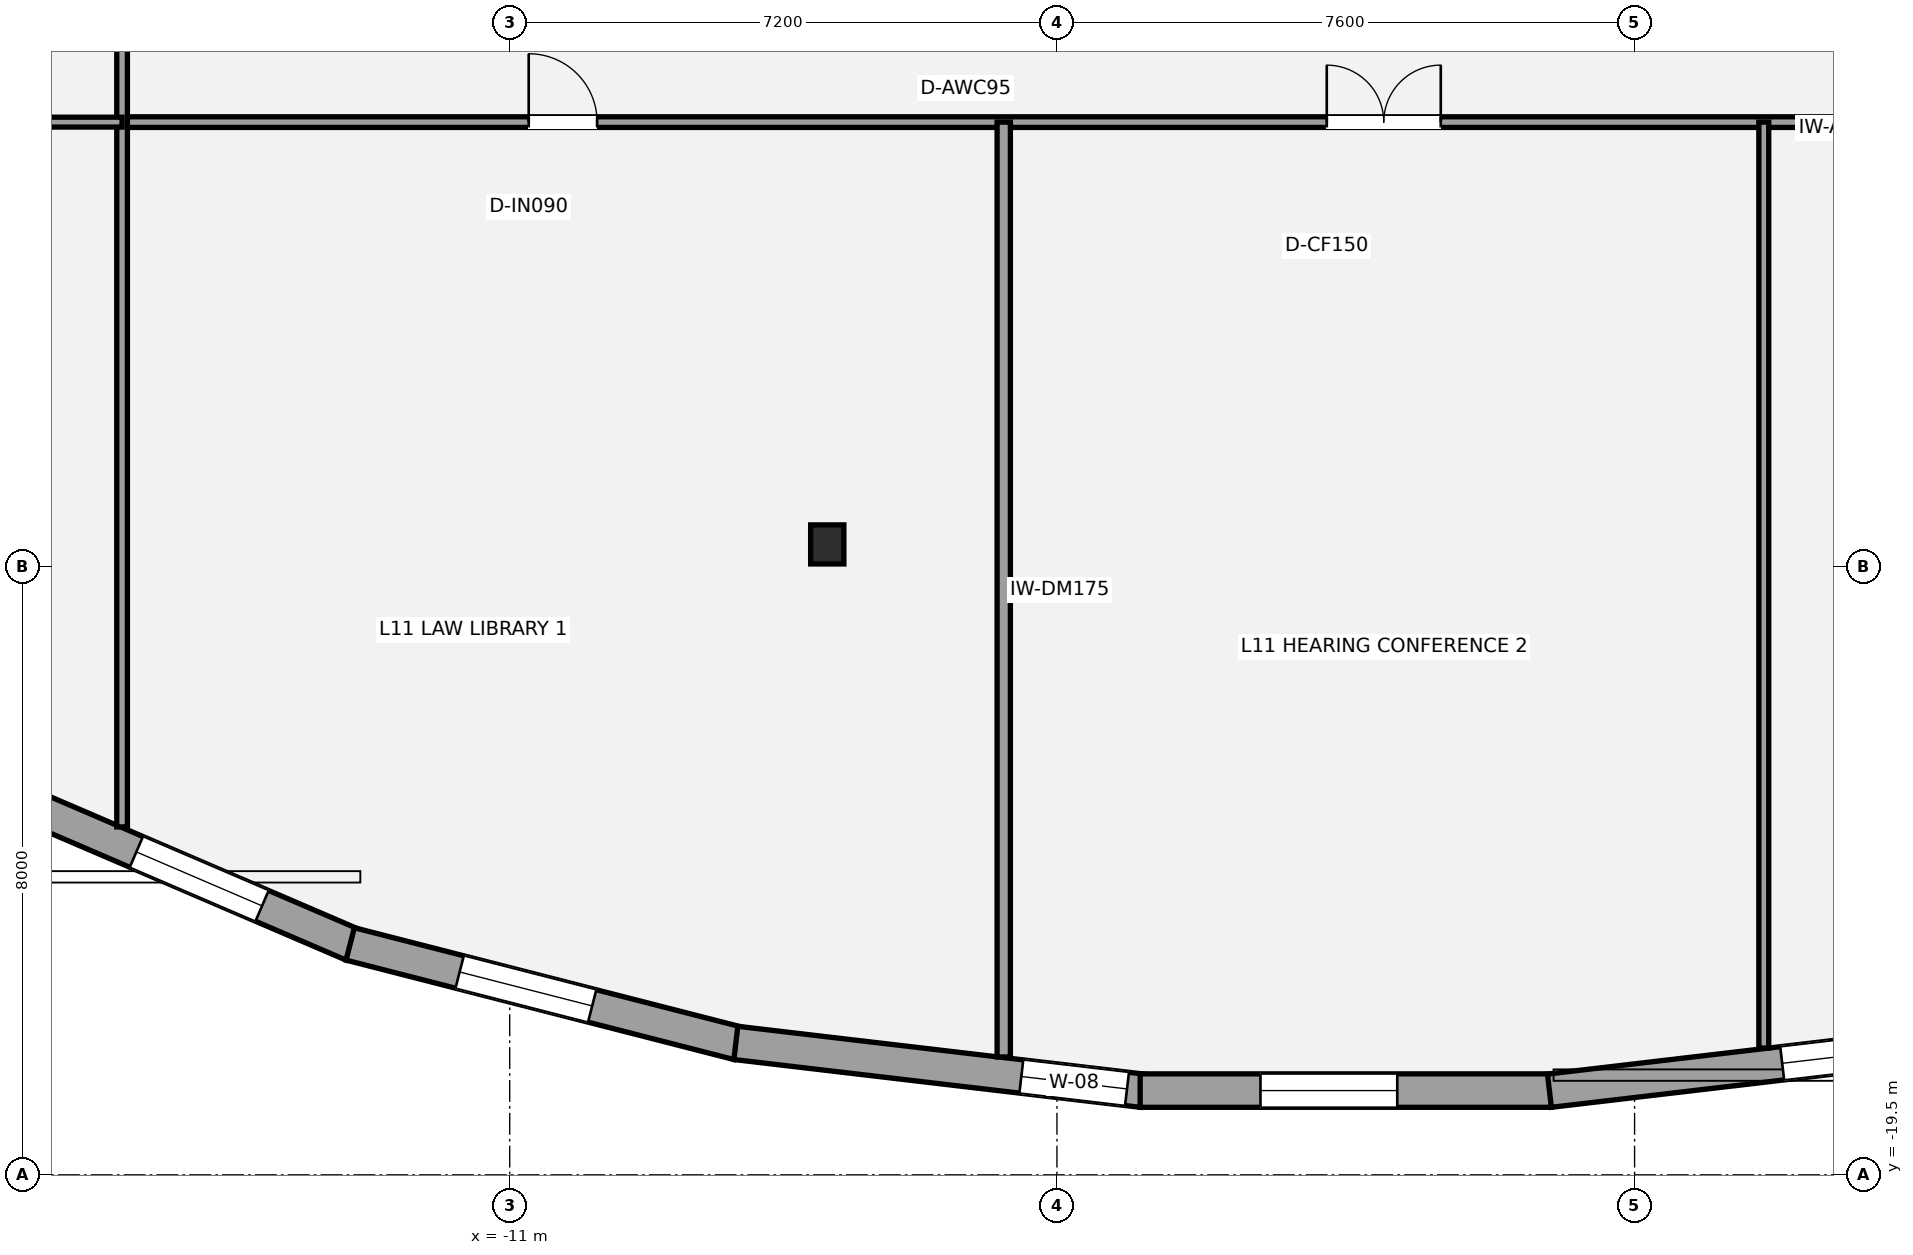
"""IFC4 building model, lengths in metres.
Left out: names, types, materials, properties, quantities, classifications, styles, units other than length and angle.
Written with IfcOpenShell. Run it as: python <this file> out.ifc"""

import sys

from ifc_helpers import new_model, si_unit, direction, frame, frame_2d, origin, origin_2d, place, context, subcontext, project, spatial, rectangle, i_section, extrude, element, fill, save


model = new_model("IFC4")
c1 = context("Model", 3, precision=1e-05, world=origin(), true_north=direction((0.0, 1.0)))
c2 = subcontext(c1, "Body", "Model", "MODEL_VIEW")
j1 = project(units=[si_unit("LENGTHUNIT", "METRE"), si_unit("PLANEANGLEUNIT", "RADIAN")], contexts=[c1])
p1 = place(None, origin())
s1 = spatial("IfcSite", under=j1, at=p1, CompositionType="ELEMENT")
p2 = place(p1, origin())
s2 = spatial("IfcBuilding", under=s1, at=p2, CompositionType="ELEMENT")
p3 = place(p2, frame((0.0, 0.0, 45.0)))
s3 = spatial("IfcBuildingStorey", under=s2, at=p3, CompositionType="ELEMENT", Elevation=45.0)
p4 = place(p3, frame((-6.822, -11.206, 0.0), z_axis=(0.0, 0.0, 1.0), x_axis=(1.0, 0.0, 0.0)))
e1 = element("IfcColumn", 1, at=p4, inside=s3, PredefinedType="COLUMN", context=c2, shape_type="SweptSolid", body=[
    extrude(i_section(OverallWidth=0.437, OverallDepth=0.514, WebThickness=0.061, FlangeThickness=0.097, at=origin_2d()), origin(), (0.0, 0.0, 1.0), 3.6),
])
p5 = place(p3, frame((-13.067, -16.473, 0.0), z_axis=(0.0, 0.0, 1.0), x_axis=(-0.918881850071, 0.394532819433, 0.0)))
e2 = element("IfcWall", 2, at=p5, inside=s3, PredefinedType="STANDARD", context=c2, shape_type="SweptSolid", body=[
    extrude(rectangle(XDim=5.042, YDim=0.44, at=frame_2d((2.521, 0.0))), origin(), (0.0, 0.0, 1.0), 2.529),
])
p6 = place(p5, frame((1.297, 0.0, 0.65)))
e3 = element("IfcOpeningElement", 3, at=p6, cuts=e2, PredefinedType="OPENING", context=c2, shape_type="SweptSolid", body=[
    extrude(rectangle(XDim=1.8, YDim=1.7, at=frame_2d((0.9, 0.85))), frame((0.0, 0.23, 0.0), z_axis=(0.0, -1.0, 0.0), x_axis=(1.0, 0.0, 0.0)), (0.0, 0.0, 1.0), 0.46),
])
p7 = place(p3, frame((-7.996, -17.77, 0.0), z_axis=(0.0, 0.0, 1.0), x_axis=(-0.968705592422, 0.248212560542, 0.0)))
e4 = element("IfcWall", 4, at=p7, inside=s3, PredefinedType="STANDARD", context=c2, shape_type="SweptSolid", body=[
    extrude(rectangle(XDim=5.268, YDim=0.44, at=frame_2d((2.634, 0.0))), origin(), (0.0, 0.0, 1.0), 2.529),
])
p8 = place(p7, frame((1.981, 0.0, 0.65)))
e5 = element("IfcOpeningElement", 5, at=p8, cuts=e4, PredefinedType="OPENING", context=c2, shape_type="SweptSolid", body=[
    extrude(rectangle(XDim=1.8, YDim=1.7, at=frame_2d((0.9, 0.85))), frame((0.0, 0.23, 0.0), z_axis=(0.0, -1.0, 0.0), x_axis=(1.0, 0.0, 0.0)), (0.0, 0.0, 1.0), 0.46),
])
p9 = place(p3, frame((-2.679, -18.393, 0.0), z_axis=(0.0, 0.0, 1.0), x_axis=(-0.993159890371, 0.116762289112, 0.0)))
e6 = element("IfcWall", 6, at=p9, inside=s3, PredefinedType="STANDARD", context=c2, shape_type="SweptSolid", body=[
    extrude(rectangle(XDim=5.382, YDim=0.44, at=frame_2d((2.691, 0.0))), origin(), (0.0, 0.0, 1.0), 2.529),
])
p10 = place(p9, frame((0.2, 0.0, 0.58)))
e7 = element("IfcOpeningElement", 7, at=p10, cuts=e6, PredefinedType="OPENING", context=c2, shape_type="SweptSolid", body=[
    extrude(rectangle(XDim=1.4, YDim=1.55, at=frame_2d((0.7, 0.775))), frame((0.0, 0.23, 0.0), z_axis=(0.0, -1.0, 0.0), x_axis=(1.0, 0.0, 0.0)), (0.0, 0.0, 1.0), 0.46),
])
p11 = place(p3, frame((2.705, -18.391, 0.0), z_axis=(0.0, 0.0, 1.0), x_axis=(-1.0, 0.0, 0.0)))
e8 = element("IfcWall", 8, at=p11, inside=s3, PredefinedType="STANDARD", context=c2, shape_type="SweptSolid", body=[
    extrude(rectangle(XDim=5.41, YDim=0.44, at=frame_2d((2.705, 0.0))), origin(), (0.0, 0.0, 1.0), 2.529),
])
p12 = place(p11, frame((2.028, 0.0, 0.65)))
e9 = element("IfcOpeningElement", 9, at=p12, cuts=e8, PredefinedType="OPENING", context=c2, shape_type="SweptSolid", body=[
    extrude(rectangle(XDim=1.8, YDim=1.7, at=frame_2d((0.9, 0.85))), frame((0.0, 0.23, 0.0), z_axis=(0.0, -1.0, 0.0), x_axis=(1.0, 0.0, 0.0)), (0.0, 0.0, 1.0), 0.46),
])
p13 = place(p3, frame((8.025, -17.764, 0.0), z_axis=(0.0, 0.0, 1.0), x_axis=(-0.993159890371, -0.116762289112, 0.0)))
e10 = element("IfcWall", 10, at=p13, inside=s3, PredefinedType="STANDARD", context=c2, shape_type="SweptSolid", body=[
    extrude(rectangle(XDim=5.382, YDim=0.44, at=frame_2d((2.691, 0.0))), origin(), (0.0, 0.0, 1.0), 2.529),
])
p14 = place(p13, frame((0.498, 0.0, 0.65)))
e11 = element("IfcOpeningElement", 11, at=p14, cuts=e10, PredefinedType="OPENING", context=c2, shape_type="SweptSolid", body=[
    extrude(rectangle(XDim=1.8, YDim=1.7, at=frame_2d((0.9, 0.85))), frame((0.0, 0.23, 0.0), z_axis=(0.0, -1.0, 0.0), x_axis=(1.0, 0.0, 0.0)), (0.0, 0.0, 1.0), 0.46),
])
p15 = place(p3, frame((-16.1, -5.65, 0.0), z_axis=(0.0, 0.0, 1.0), x_axis=(1.0, 0.0, 0.0)))
e12 = element("IfcWall", 12, at=p15, inside=s3, PredefinedType="PARTITIONING", context=c2, shape_type="SweptSolid", body=[
    extrude(rectangle(XDim=34.1, YDim=0.14, at=frame_2d((17.05, 0.0))), origin(), (0.0, 0.0, 1.0), 2.853),
])
p16 = place(p15, frame((5.35, 0.0, 0.0)))
e13 = element("IfcOpeningElement", 13, at=p16, cuts=e12, PredefinedType="OPENING", context=c2, shape_type="SweptSolid", body=[
    extrude(rectangle(XDim=0.9, YDim=2.1, at=frame_2d((0.45, 1.05))), frame((0.0, 0.08, 0.0), z_axis=(0.0, -1.0, 0.0), x_axis=(1.0, 0.0, 0.0)), (0.0, 0.0, 1.0), 0.16),
])
p17 = place(p15, frame((15.85, 0.0, 0.0)))
e14 = element("IfcOpeningElement", 14, at=p17, cuts=e12, PredefinedType="OPENING", context=c2, shape_type="SweptSolid", body=[
    extrude(rectangle(XDim=1.5, YDim=2.15, at=frame_2d((0.75, 1.075))), frame((0.0, 0.08, 0.0), z_axis=(0.0, -1.0, 0.0), x_axis=(1.0, 0.0, 0.0)), (0.0, 0.0, 1.0), 0.16),
])
p18 = place(p15, frame((27.4, 0.0, 0.0)))
e15 = element("IfcOpeningElement", 15, at=p18, cuts=e12, PredefinedType="OPENING", context=c2, shape_type="SweptSolid", body=[
    extrude(rectangle(XDim=0.9, YDim=2.1, at=frame_2d((0.45, 1.05))), frame((0.0, 0.08, 0.0), z_axis=(0.0, -1.0, 0.0), x_axis=(1.0, 0.0, 0.0)), (0.0, 0.0, 1.0), 0.16),
])
p19 = place(p3, frame((-16.1, -14.922, 0.0), z_axis=(0.0, 0.0, 1.0), x_axis=(0.0, 1.0, 0.0)))
e16 = element("IfcWall", 16, at=p19, inside=s3, PredefinedType="PARTITIONING", context=c2, shape_type="SweptSolid", body=[
    extrude(rectangle(XDim=20.772, YDim=0.14, at=frame_2d((10.386, 0.0))), origin(), (0.0, 0.0, 1.0), 2.841),
])
p20 = place(p19, frame((10.547, 0.0, 0.0)))
e17 = element("IfcOpeningElement", 17, at=p20, cuts=e16, PredefinedType="OPENING", context=c2, shape_type="SweptSolid", body=[
    extrude(rectangle(XDim=0.9, YDim=2.1, at=frame_2d((0.45, 1.05))), frame((0.0, 0.08, 0.0), z_axis=(0.0, -1.0, 0.0), x_axis=(1.0, 0.0, 0.0)), (0.0, 0.0, 1.0), 0.16),
])
p21 = place(p19, frame((14.472, 0.0, 0.0)))
e18 = element("IfcOpeningElement", 18, at=p21, cuts=e16, PredefinedType="OPENING", context=c2, shape_type="SweptSolid", body=[
    extrude(rectangle(XDim=0.9, YDim=2.1, at=frame_2d((0.45, 1.05))), frame((0.0, 0.08, 0.0), z_axis=(0.0, -1.0, 0.0), x_axis=(1.0, 0.0, 0.0)), (0.0, 0.0, 1.0), 0.16),
])
p22 = place(p19, frame((18.497, 0.0, 0.0)))
e19 = element("IfcOpeningElement", 19, at=p22, cuts=e16, PredefinedType="OPENING", context=c2, shape_type="SweptSolid", body=[
    extrude(rectangle(XDim=0.9, YDim=2.1, at=frame_2d((0.45, 1.05))), frame((0.0, 0.08, 0.0), z_axis=(0.0, -1.0, 0.0), x_axis=(1.0, 0.0, 0.0)), (0.0, 0.0, 1.0), 0.16),
])
p23 = place(p3, frame((-4.5, -17.949, 0.0), z_axis=(0.0, 0.0, 1.0), x_axis=(0.0, 1.0, 0.0)))
e20 = element("IfcWall", 20, at=p23, inside=s3, PredefinedType="PARTITIONING", context=c2, shape_type="SweptSolid", body=[
    extrude(rectangle(XDim=12.299, YDim=0.175, at=frame_2d((6.15, 0.0))), origin(), (0.0, 0.0, 1.0), 2.853),
])
p24 = place(p3, frame((5.5, -17.832, 0.0), z_axis=(0.0, 0.0, 1.0), x_axis=(0.0, 1.0, 0.0)))
e21 = element("IfcWall", 21, at=p24, inside=s3, PredefinedType="PARTITIONING", context=c2, shape_type="SweptSolid", body=[
    extrude(rectangle(XDim=12.182, YDim=0.13, at=frame_2d((6.091, 0.0))), origin(), (0.0, 0.0, 1.0), 3.4),
])
p25 = place(p3, frame((-25.917, -5.65, 0.0), z_axis=(0.0, 0.0, 1.0), x_axis=(1.0, 0.0, 0.0)))
e22 = element("IfcWall", 22, at=p25, inside=s3, PredefinedType="PARTITIONING", context=c2, shape_type="SweptSolid", body=[
    extrude(rectangle(XDim=9.816, YDim=0.13, at=frame_2d((4.908, 0.0))), origin(), (0.0, 0.0, 1.0), 2.779),
])
p26 = place(p25, frame((0.51, 0.0, 0.0)))
e23 = element("IfcOpeningElement", 23, at=p26, cuts=e22, PredefinedType="OPENING", context=c2, shape_type="SweptSolid", body=[
    extrude(rectangle(XDim=0.9, YDim=2.1, at=frame_2d((0.45, 1.05))), frame((0.0, 0.075, 0.0), z_axis=(0.0, -1.0, 0.0), x_axis=(1.0, 0.0, 0.0)), (0.0, 0.0, 1.0), 0.15),
])
p27 = place(p6, origin())
e24 = element("IfcWindow", 24, at=p27, inside=s3, PartitioningType="SINGLE_PANEL", PredefinedType="WINDOW", context=c2, shape_type="SweptSolid", body=[
    extrude(rectangle(XDim=1.8, YDim=1.7, at=frame_2d((0.9, 0.85))), frame((0.0, -0.01, 0.0), z_axis=(0.0, -1.0, 0.0), x_axis=(1.0, 0.0, 0.0)), (0.0, 0.0, 1.0), 0.06),
])
fill(e3, e24)
p28 = place(p8, origin())
e25 = element("IfcWindow", 25, at=p28, inside=s3, PartitioningType="SINGLE_PANEL", PredefinedType="WINDOW", context=c2, shape_type="SweptSolid", body=[
    extrude(rectangle(XDim=1.8, YDim=1.7, at=frame_2d((0.9, 0.85))), frame((0.0, -0.01, 0.0), z_axis=(0.0, -1.0, 0.0), x_axis=(1.0, 0.0, 0.0)), (0.0, 0.0, 1.0), 0.06),
])
fill(e5, e25)
p29 = place(p10, origin())
e26 = element("IfcWindow", 26, at=p29, inside=s3, PartitioningType="SINGLE_PANEL", PredefinedType="WINDOW", context=c2, shape_type="SweptSolid", body=[
    extrude(rectangle(XDim=1.4, YDim=1.55, at=frame_2d((0.7, 0.775))), frame((0.0, -0.01, 0.0), z_axis=(0.0, -1.0, 0.0), x_axis=(1.0, 0.0, 0.0)), (0.0, 0.0, 1.0), 0.06),
])
fill(e7, e26)
p30 = place(p12, origin())
e27 = element("IfcWindow", 27, at=p30, inside=s3, PartitioningType="SINGLE_PANEL", PredefinedType="WINDOW", context=c2, shape_type="SweptSolid", body=[
    extrude(rectangle(XDim=1.8, YDim=1.7, at=frame_2d((0.9, 0.85))), frame((0.0, -0.01, 0.0), z_axis=(0.0, -1.0, 0.0), x_axis=(1.0, 0.0, 0.0)), (0.0, 0.0, 1.0), 0.06),
])
fill(e9, e27)
p31 = place(p14, origin())
e28 = element("IfcWindow", 28, at=p31, inside=s3, PartitioningType="SINGLE_PANEL", PredefinedType="WINDOW", context=c2, shape_type="SweptSolid", body=[
    extrude(rectangle(XDim=1.8, YDim=1.7, at=frame_2d((0.9, 0.85))), frame((0.0, -0.01, 0.0), z_axis=(0.0, -1.0, 0.0), x_axis=(1.0, 0.0, 0.0)), (0.0, 0.0, 1.0), 0.06),
])
fill(e11, e28)
p32 = place(p16, origin())
e29 = element("IfcDoor", 29, at=p32, inside=s3, OperationType="SINGLE_SWING_LEFT", PredefinedType="DOOR", context=c2, shape_type="SweptSolid", body=[
    extrude(rectangle(XDim=0.9, YDim=2.1, at=frame_2d((0.45, 1.05))), frame((0.0, 0.025, 0.0), z_axis=(0.0, -1.0, 0.0), x_axis=(1.0, 0.0, 0.0)), (0.0, 0.0, 1.0), 0.05),
])
fill(e13, e29)
p33 = place(p17, origin())
e30 = element("IfcDoor", 30, at=p33, inside=s3, OperationType="DOUBLE_DOOR_SINGLE_SWING", PredefinedType="DOOR", context=c2, shape_type="SweptSolid", body=[
    extrude(rectangle(XDim=1.5, YDim=2.15, at=frame_2d((0.75, 1.075))), frame((0.0, 0.025, 0.0), z_axis=(0.0, -1.0, 0.0), x_axis=(1.0, 0.0, 0.0)), (0.0, 0.0, 1.0), 0.05),
])
fill(e14, e30)
save(model, sys.argv[1])
